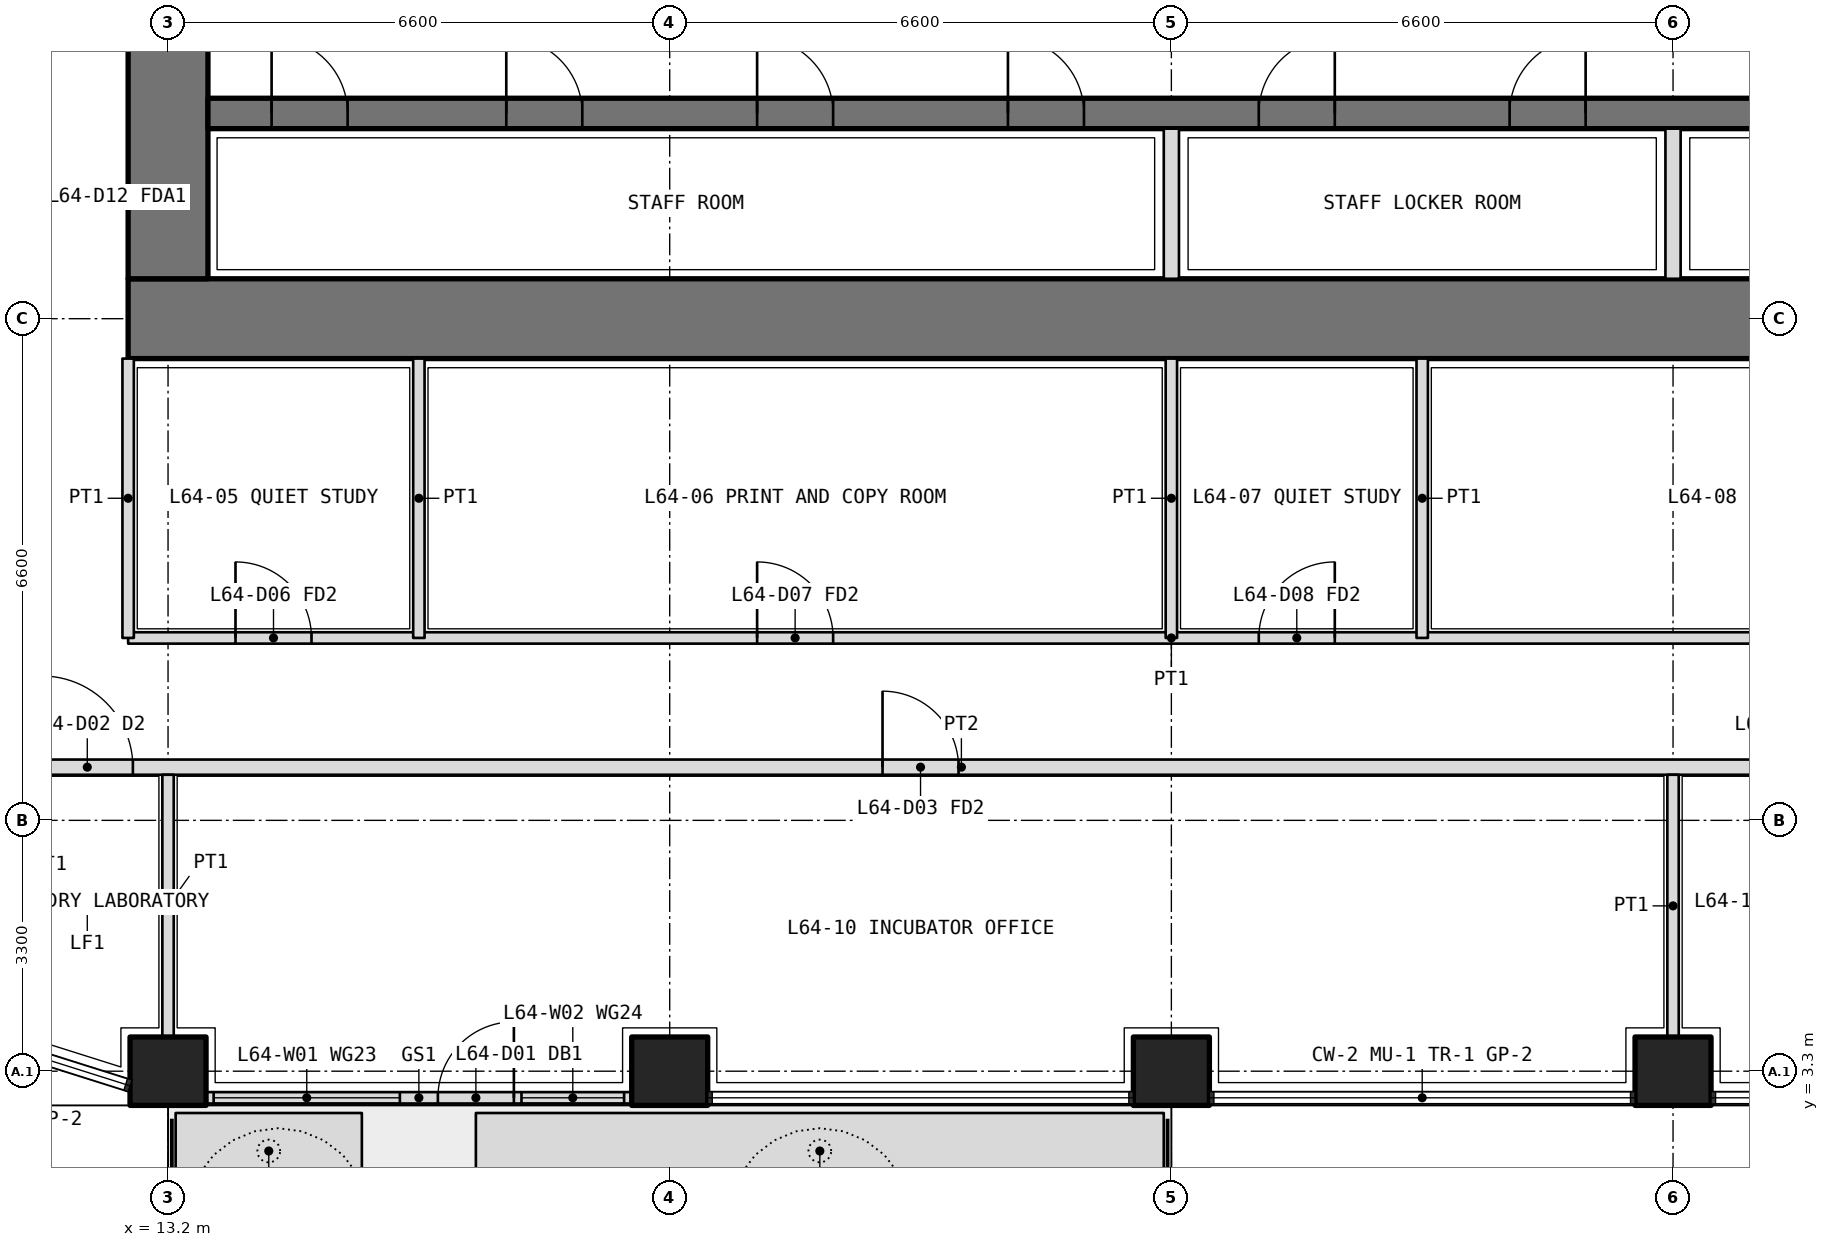
"""IFC4 building model, lengths in metres.
Left out: names, types, materials, properties, quantities, classifications, styles, units other than length and angle.
Written with IfcOpenShell. Run it as: python <this file> out.ifc"""

import sys

from ifc_helpers import new_model, si_unit, direction, frame, frame_2d, origin, origin_2d, place, context, subcontext, project, spatial, polyline, rectangle, outline, extrude, element, fill, save


model = new_model("IFC4")
c1 = context("Model", 3, precision=1e-05, world=origin(), true_north=direction((0.0, 1.0)))
c2 = subcontext(c1, "Body", "Model", "MODEL_VIEW")
j1 = project(units=[si_unit("LENGTHUNIT", "METRE"), si_unit("PLANEANGLEUNIT", "RADIAN")], contexts=[c1])
p1 = place(None, origin())
s1 = spatial("IfcSite", under=j1, at=p1, CompositionType="ELEMENT")
p2 = place(p1, origin())
s2 = spatial("IfcBuilding", under=s1, at=p2, CompositionType="ELEMENT")
p3 = place(p2, frame((0.0, 0.0, 279.6)))
s3 = spatial("IfcBuildingStorey", under=s2, at=p3, CompositionType="ELEMENT", Elevation=279.6)
for number, where, z_axis, x_axis in (
    (1, (13.2, 3.3, 0.0), (0.0, 0.0, 1.0), (1.0, 0.0, 0.0)),
    (2, (19.8, 3.3, 0.0), (0.0, 0.0, 1.0), (1.0, 0.0, 0.0)),
    (3, (26.4, 3.3, 0.0), (0.0, 0.0, 1.0), (1.0, 0.0, 0.0)),
    (4, (33.0, 3.3, 0.0), (0.0, 0.0, 1.0), (1.0, 0.0, 0.0)),
):
    element("IfcColumn", number, at=place(p3, frame(where, z_axis=z_axis, x_axis=x_axis)), inside=s3, PredefinedType="COLUMN", context=c2, shape_type="SweptSolid", body=[
        extrude(rectangle(XDim=1.0, YDim=0.9, at=origin_2d()), origin(), (0.0, 0.0, 1.0), 4.2),
    ])
p4 = place(p3, origin())
e5 = element("IfcWall", 5, at=p4, inside=s3, PredefinedType="USERDEFINED", context=c2, shape_type="SweptSolid", body=[
    extrude(outline(polyline([(13.3, 1.75), (15.75, 1.75), (15.75, 2.75), (13.3, 2.75), (13.3, 1.75)]), holes=[polyline([(13.45, 1.9), (15.6, 1.9), (15.6, 2.6), (13.45, 2.6), (13.45, 1.9)])]), origin(), (0.0, 0.0, 1.0), 1.05),
])
p5 = place(p3, origin())
e6 = element("IfcWall", 6, at=p5, inside=s3, PredefinedType="USERDEFINED", context=c2, shape_type="SweptSolid", body=[
    extrude(outline(polyline([(17.25, 1.75), (26.3, 1.75), (26.3, 2.75), (17.25, 2.75), (17.25, 1.75)]), holes=[polyline([(17.4, 1.9), (26.15, 1.9), (26.15, 2.6), (17.4, 2.6), (17.4, 1.9)])]), origin(), (0.0, 0.0, 1.0), 1.05),
])
p6 = place(p3, frame((13.7, 2.95, 0.0), z_axis=(0.0, 0.0, 1.0), x_axis=(1.0, 0.0, 0.0)))
e7 = element("IfcWall", 7, at=p6, inside=s3, PredefinedType="SOLIDWALL", context=c2, shape_type="SweptSolid", body=[
    extrude(rectangle(XDim=5.6, YDim=0.15, at=frame_2d((2.8, 0.0))), origin(), (0.0, 0.0, 1.0), 2.7),
])
p7 = place(p6, frame((3.05, 0.0, 0.0)))
e8 = element("IfcOpeningElement", 8, at=p7, cuts=e7, PredefinedType="OPENING", context=c2, shape_type="SweptSolid", body=[
    extrude(rectangle(XDim=1.0, YDim=2.4, at=frame_2d((0.5, 1.2))), frame((0.0, 0.085, 0.0), z_axis=(0.0, -1.0, 0.0), x_axis=(1.0, 0.0, 0.0)), (0.0, 0.0, 1.0), 0.17),
])
p8 = place(p6, frame((0.1, 0.0, 0.1)))
e9 = element("IfcOpeningElement", 9, at=p8, cuts=e7, PredefinedType="OPENING", context=c2, shape_type="SweptSolid", body=[
    extrude(rectangle(XDim=2.45, YDim=2.3, at=frame_2d((1.225, 1.15))), frame((0.0, 0.085, 0.0), z_axis=(0.0, -1.0, 0.0), x_axis=(1.0, 0.0, 0.0)), (0.0, 0.0, 1.0), 0.17),
])
p9 = place(p6, frame((4.15, 0.0, 0.1)))
e10 = element("IfcOpeningElement", 10, at=p9, cuts=e7, PredefinedType="OPENING", context=c2, shape_type="SweptSolid", body=[
    extrude(rectangle(XDim=1.35, YDim=2.3, at=frame_2d((0.675, 1.15))), frame((0.0, 0.085, 0.0), z_axis=(0.0, -1.0, 0.0), x_axis=(1.0, 0.0, 0.0)), (0.0, 0.0, 1.0), 0.17),
])
p10 = place(p3, frame((12.675, 13.2, 0.0), z_axis=(0.0, 0.0, 1.0), x_axis=(1.0, 0.0, 0.0)))
e11 = element("IfcWall", 11, at=p10, inside=s3, PredefinedType="SHEAR", context=c2, shape_type="SweptSolid", body=[
    extrude(rectangle(XDim=27.45, YDim=1.05, at=frame_2d((13.725, 0.0))), origin(), (0.0, 0.0, 1.0), 4.2),
])
p11 = place(p3, frame((13.2, 32.475, 0.0), z_axis=(0.0, 0.0, 1.0), x_axis=(0.0, -1.0, 0.0)))
e12 = element("IfcWall", 12, at=p11, inside=s3, PredefinedType="SHEAR", context=c2, shape_type="SweptSolid", body=[
    extrude(rectangle(XDim=18.75, YDim=1.05, at=frame_2d((9.375, 0.0))), origin(), (0.0, 0.0, 1.0), 4.2),
])
p12 = place(p11, frame((14.125, 0.0, 0.0)))
e13 = element("IfcOpeningElement", 13, at=p12, cuts=e12, PredefinedType="OPENING", context=c2, shape_type="SweptSolid", body=[
    extrude(rectangle(XDim=1.6, YDim=2.1, at=frame_2d((0.8, 1.05))), frame((0.0, 0.535, 0.0), z_axis=(0.0, -1.0, 0.0), x_axis=(1.0, 0.0, 0.0)), (0.0, 0.0, 1.0), 1.07),
])
p13 = place(p11, frame((3.325, 0.0, 0.0)))
e14 = element("IfcOpeningElement", 14, at=p13, cuts=e12, PredefinedType="OPENING", context=c2, shape_type="SweptSolid", body=[
    extrude(rectangle(XDim=1.6, YDim=2.1, at=frame_2d((0.8, 1.05))), frame((0.0, 0.535, 0.0), z_axis=(0.0, -1.0, 0.0), x_axis=(1.0, 0.0, 0.0)), (0.0, 0.0, 1.0), 1.07),
])
p14 = place(p3, frame((13.725, 15.9, 0.0), z_axis=(0.0, 0.0, 1.0), x_axis=(1.0, 0.0, 0.0)))
e15 = element("IfcWall", 15, at=p14, inside=s3, PredefinedType="SHEAR", context=c2, shape_type="SweptSolid", body=[
    extrude(rectangle(XDim=25.35, YDim=0.4, at=frame_2d((12.675, 0.0))), origin(), (0.0, 0.0, 1.0), 4.2),
])
p15 = place(p14, frame((0.837, 0.0, 0.0)))
e16 = element("IfcOpeningElement", 16, at=p15, cuts=e15, PredefinedType="OPENING", context=c2, shape_type="SweptSolid", body=[
    extrude(rectangle(XDim=1.0, YDim=2.1, at=frame_2d((0.5, 1.05))), frame((0.0, 0.21, 0.0), z_axis=(0.0, -1.0, 0.0), x_axis=(1.0, 0.0, 0.0)), (0.0, 0.0, 1.0), 0.42),
])
p16 = place(p14, frame((3.925, 0.0, 0.0)))
e17 = element("IfcOpeningElement", 17, at=p16, cuts=e15, PredefinedType="OPENING", context=c2, shape_type="SweptSolid", body=[
    extrude(rectangle(XDim=1.0, YDim=2.1, at=frame_2d((0.5, 1.05))), frame((0.0, 0.21, 0.0), z_axis=(0.0, -1.0, 0.0), x_axis=(1.0, 0.0, 0.0)), (0.0, 0.0, 1.0), 0.42),
])
p17 = place(p14, frame((7.225, 0.0, 0.0)))
e18 = element("IfcOpeningElement", 18, at=p17, cuts=e15, PredefinedType="OPENING", context=c2, shape_type="SweptSolid", body=[
    extrude(rectangle(XDim=1.0, YDim=2.1, at=frame_2d((0.5, 1.05))), frame((0.0, 0.21, 0.0), z_axis=(0.0, -1.0, 0.0), x_axis=(1.0, 0.0, 0.0)), (0.0, 0.0, 1.0), 0.42),
])
p18 = place(p14, frame((10.525, 0.0, 0.0)))
e19 = element("IfcOpeningElement", 19, at=p18, cuts=e15, PredefinedType="OPENING", context=c2, shape_type="SweptSolid", body=[
    extrude(rectangle(XDim=1.0, YDim=2.1, at=frame_2d((0.5, 1.05))), frame((0.0, 0.21, 0.0), z_axis=(0.0, -1.0, 0.0), x_axis=(1.0, 0.0, 0.0)), (0.0, 0.0, 1.0), 0.42),
])
p19 = place(p14, frame((13.825, 0.0, 0.0)))
e20 = element("IfcOpeningElement", 20, at=p19, cuts=e15, PredefinedType="OPENING", context=c2, shape_type="SweptSolid", body=[
    extrude(rectangle(XDim=1.0, YDim=2.1, at=frame_2d((0.5, 1.05))), frame((0.0, 0.21, 0.0), z_axis=(0.0, -1.0, 0.0), x_axis=(1.0, 0.0, 0.0)), (0.0, 0.0, 1.0), 0.42),
])
p20 = place(p14, frame((17.125, 0.0, 0.0)))
e21 = element("IfcOpeningElement", 21, at=p20, cuts=e15, PredefinedType="OPENING", context=c2, shape_type="SweptSolid", body=[
    extrude(rectangle(XDim=1.0, YDim=2.1, at=frame_2d((0.5, 1.05))), frame((0.0, 0.21, 0.0), z_axis=(0.0, -1.0, 0.0), x_axis=(1.0, 0.0, 0.0)), (0.0, 0.0, 1.0), 0.42),
])
p21 = place(p14, frame((20.425, 0.0, 0.0)))
e22 = element("IfcOpeningElement", 22, at=p21, cuts=e15, PredefinedType="OPENING", context=c2, shape_type="SweptSolid", body=[
    extrude(rectangle(XDim=1.0, YDim=2.1, at=frame_2d((0.5, 1.05))), frame((0.0, 0.21, 0.0), z_axis=(0.0, -1.0, 0.0), x_axis=(1.0, 0.0, 0.0)), (0.0, 0.0, 1.0), 0.42),
])
p22 = place(p14, frame((23.512, 0.0, 0.0)))
e23 = element("IfcOpeningElement", 23, at=p22, cuts=e15, PredefinedType="OPENING", context=c2, shape_type="SweptSolid", body=[
    extrude(rectangle(XDim=1.0, YDim=2.1, at=frame_2d((0.5, 1.05))), frame((0.0, 0.21, 0.0), z_axis=(0.0, -1.0, 0.0), x_axis=(1.0, 0.0, 0.0)), (0.0, 0.0, 1.0), 0.42),
])
for number, where, z_axis, x_axis in (
    (24, (26.4, 13.725, 0.0), (0.0, 0.0, 1.0), (0.0, 1.0, 0.0)),
    (25, (33.0, 13.725, 0.0), (0.0, 0.0, 1.0), (0.0, 1.0, 0.0)),
):
    element("IfcWall", number, at=place(p3, frame(where, z_axis=z_axis, x_axis=x_axis)), inside=s3, PredefinedType="PARTITIONING", context=c2, shape_type="SweptSolid", body=[
        extrude(rectangle(XDim=1.975, YDim=0.2, at=frame_2d((0.987, 0.0))), origin(), (0.0, 0.0, 1.0), 4.2),
    ])
p23 = place(p3, frame((12.675, 9.0, 0.0), z_axis=(0.0, 0.0, 1.0), x_axis=(1.0, 0.0, 0.0)))
e26 = element("IfcWall", 26, at=p23, inside=s3, PredefinedType="PARTITIONING", context=c2, shape_type="SweptSolid", body=[
    extrude(rectangle(XDim=27.45, YDim=0.15, at=frame_2d((13.725, 0.0))), origin(), (0.0, 0.0, 1.0), 3.0),
])
p24 = place(p23, frame((1.413, 0.0, 0.0)))
e27 = element("IfcOpeningElement", 27, at=p24, cuts=e26, PredefinedType="OPENING", context=c2, shape_type="SweptSolid", body=[
    extrude(rectangle(XDim=1.0, YDim=2.1, at=frame_2d((0.5, 1.05))), frame((0.0, 0.085, 0.0), z_axis=(0.0, -1.0, 0.0), x_axis=(1.0, 0.0, 0.0)), (0.0, 0.0, 1.0), 0.17),
])
p25 = place(p23, frame((8.275, 0.0, 0.0)))
e28 = element("IfcOpeningElement", 28, at=p25, cuts=e26, PredefinedType="OPENING", context=c2, shape_type="SweptSolid", body=[
    extrude(rectangle(XDim=1.0, YDim=2.1, at=frame_2d((0.5, 1.05))), frame((0.0, 0.085, 0.0), z_axis=(0.0, -1.0, 0.0), x_axis=(1.0, 0.0, 0.0)), (0.0, 0.0, 1.0), 0.17),
])
p26 = place(p23, frame((14.875, 0.0, 0.0)))
e29 = element("IfcOpeningElement", 29, at=p26, cuts=e26, PredefinedType="OPENING", context=c2, shape_type="SweptSolid", body=[
    extrude(rectangle(XDim=1.0, YDim=2.1, at=frame_2d((0.5, 1.05))), frame((0.0, 0.085, 0.0), z_axis=(0.0, -1.0, 0.0), x_axis=(1.0, 0.0, 0.0)), (0.0, 0.0, 1.0), 0.17),
])
p27 = place(p23, frame((21.738, 0.0, 0.0)))
e30 = element("IfcOpeningElement", 30, at=p27, cuts=e26, PredefinedType="OPENING", context=c2, shape_type="SweptSolid", body=[
    extrude(rectangle(XDim=1.0, YDim=2.1, at=frame_2d((0.5, 1.05))), frame((0.0, 0.085, 0.0), z_axis=(0.0, -1.0, 0.0), x_axis=(1.0, 0.0, 0.0)), (0.0, 0.0, 1.0), 0.17),
])
p28 = place(p3, frame((12.675, 12.675, 0.0), z_axis=(0.0, 0.0, 1.0), x_axis=(0.0, -1.0, 0.0)))
e31 = element("IfcWall", 31, at=p28, inside=s3, PredefinedType="PARTITIONING", context=c2, shape_type="SweptSolid", body=[
    extrude(rectangle(XDim=3.675, YDim=0.15, at=frame_2d((1.837, 0.0))), origin(), (0.0, 0.0, 1.0), 3.0),
])
p29 = place(p3, frame((16.5, 12.675, 0.0), z_axis=(0.0, 0.0, 1.0), x_axis=(0.0, -1.0, 0.0)))
e32 = element("IfcWall", 32, at=p29, inside=s3, PredefinedType="PARTITIONING", context=c2, shape_type="SweptSolid", body=[
    extrude(rectangle(XDim=3.675, YDim=0.15, at=frame_2d((1.837, 0.0))), origin(), (0.0, 0.0, 1.0), 3.9),
])
p30 = place(p3, frame((26.4, 12.675, 0.0), z_axis=(0.0, 0.0, 1.0), x_axis=(0.0, -1.0, 0.0)))
e33 = element("IfcWall", 33, at=p30, inside=s3, PredefinedType="PARTITIONING", context=c2, shape_type="SweptSolid", body=[
    extrude(rectangle(XDim=3.675, YDim=0.15, at=frame_2d((1.837, 0.0))), origin(), (0.0, 0.0, 1.0), 3.0),
])
p31 = place(p3, frame((29.7, 12.675, 0.0), z_axis=(0.0, 0.0, 1.0), x_axis=(0.0, -1.0, 0.0)))
e34 = element("IfcWall", 34, at=p31, inside=s3, PredefinedType="PARTITIONING", context=c2, shape_type="SweptSolid", body=[
    extrude(rectangle(XDim=3.675, YDim=0.15, at=frame_2d((1.837, 0.0))), origin(), (0.0, 0.0, 1.0), 3.9),
])
p32 = place(p3, frame((10.975, 7.3, 0.0), z_axis=(0.0, 0.0, 1.0), x_axis=(1.0, 0.0, 0.0)))
e35 = element("IfcWall", 35, at=p32, inside=s3, PredefinedType="PARTITIONING", context=c2, shape_type="SweptSolid", body=[
    extrude(rectangle(XDim=25.325, YDim=0.2, at=frame_2d((12.663, 0.0))), origin(), (0.0, 0.0, 1.0), 3.0),
])
p33 = place(p32, frame((0.562, 0.0, 0.0)))
e36 = element("IfcOpeningElement", 36, at=p33, cuts=e35, PredefinedType="OPENING", context=c2, shape_type="SweptSolid", body=[
    extrude(rectangle(XDim=1.2, YDim=2.1, at=frame_2d((0.6, 1.05))), frame((0.0, 0.11, 0.0), z_axis=(0.0, -1.0, 0.0), x_axis=(1.0, 0.0, 0.0)), (0.0, 0.0, 1.0), 0.22),
])
p34 = place(p32, frame((11.625, 0.0, 0.0)))
e37 = element("IfcOpeningElement", 37, at=p34, cuts=e35, PredefinedType="OPENING", context=c2, shape_type="SweptSolid", body=[
    extrude(rectangle(XDim=1.0, YDim=2.1, at=frame_2d((0.5, 1.05))), frame((0.0, 0.11, 0.0), z_axis=(0.0, -1.0, 0.0), x_axis=(1.0, 0.0, 0.0)), (0.0, 0.0, 1.0), 0.22),
])
p35 = place(p32, frame((23.175, 0.0, 0.0)))
e38 = element("IfcOpeningElement", 38, at=p35, cuts=e35, PredefinedType="OPENING", context=c2, shape_type="SweptSolid", body=[
    extrude(rectangle(XDim=1.0, YDim=2.1, at=frame_2d((0.5, 1.05))), frame((0.0, 0.11, 0.0), z_axis=(0.0, -1.0, 0.0), x_axis=(1.0, 0.0, 0.0)), (0.0, 0.0, 1.0), 0.22),
])
for number, where, z_axis, x_axis in (
    (39, (13.2, 3.75, 0.0), (0.0, 0.0, 1.0), (0.0, 1.0, 0.0)),
    (40, (33.0, 3.75, 0.0), (0.0, 0.0, 1.0), (0.0, 1.0, 0.0)),
):
    element("IfcWall", number, at=place(p3, frame(where, z_axis=z_axis, x_axis=x_axis)), inside=s3, PredefinedType="PARTITIONING", context=c2, shape_type="SweptSolid", body=[
        extrude(rectangle(XDim=3.45, YDim=0.15, at=frame_2d((1.725, 0.0))), origin(), (0.0, 0.0, 1.0), 3.0),
    ])
p36 = place(p7, origin())
e41 = element("IfcDoor", 41, at=p36, inside=s3, OperationType="SINGLE_SWING_RIGHT", PredefinedType="DOOR", context=c2, shape_type="SweptSolid", body=[
    extrude(rectangle(XDim=1.0, YDim=2.4, at=frame_2d((0.5, 1.2))), frame((0.0, 0.025, 0.0), z_axis=(0.0, -1.0, 0.0), x_axis=(1.0, 0.0, 0.0)), (0.0, 0.0, 1.0), 0.05),
])
fill(e8, e41)
p37 = place(p8, origin())
e42 = element("IfcWindow", 42, at=p37, inside=s3, PartitioningType="SINGLE_PANEL", PredefinedType="WINDOW", context=c2, shape_type="SweptSolid", body=[
    extrude(rectangle(XDim=2.45, YDim=2.3, at=frame_2d((1.225, 1.15))), frame((0.0, 0.03, 0.0), z_axis=(0.0, -1.0, 0.0), x_axis=(1.0, 0.0, 0.0)), (0.0, 0.0, 1.0), 0.06),
])
fill(e9, e42)
p38 = place(p9, origin())
e43 = element("IfcWindow", 43, at=p38, inside=s3, PartitioningType="SINGLE_PANEL", PredefinedType="WINDOW", context=c2, shape_type="SweptSolid", body=[
    extrude(rectangle(XDim=1.35, YDim=2.3, at=frame_2d((0.675, 1.15))), frame((0.0, 0.03, 0.0), z_axis=(0.0, -1.0, 0.0), x_axis=(1.0, 0.0, 0.0)), (0.0, 0.0, 1.0), 0.06),
])
fill(e10, e43)
p39 = place(p24, origin())
e44 = element("IfcDoor", 44, at=p39, inside=s3, OperationType="SINGLE_SWING_LEFT", PredefinedType="DOOR", context=c2, shape_type="SweptSolid", body=[
    extrude(rectangle(XDim=1.0, YDim=2.1, at=frame_2d((0.5, 1.05))), frame((0.0, 0.025, 0.0), z_axis=(0.0, -1.0, 0.0), x_axis=(1.0, 0.0, 0.0)), (0.0, 0.0, 1.0), 0.05),
])
fill(e27, e44)
p40 = place(p25, origin())
e45 = element("IfcDoor", 45, at=p40, inside=s3, OperationType="SINGLE_SWING_LEFT", PredefinedType="DOOR", context=c2, shape_type="SweptSolid", body=[
    extrude(rectangle(XDim=1.0, YDim=2.1, at=frame_2d((0.5, 1.05))), frame((0.0, 0.025, 0.0), z_axis=(0.0, -1.0, 0.0), x_axis=(1.0, 0.0, 0.0)), (0.0, 0.0, 1.0), 0.05),
])
fill(e28, e45)
p41 = place(p26, origin())
e46 = element("IfcDoor", 46, at=p41, inside=s3, OperationType="SINGLE_SWING_RIGHT", PredefinedType="DOOR", context=c2, shape_type="SweptSolid", body=[
    extrude(rectangle(XDim=1.0, YDim=2.1, at=frame_2d((0.5, 1.05))), frame((0.0, 0.025, 0.0), z_axis=(0.0, -1.0, 0.0), x_axis=(1.0, 0.0, 0.0)), (0.0, 0.0, 1.0), 0.05),
])
fill(e29, e46)
p42 = place(p33, origin())
e47 = element("IfcDoor", 47, at=p42, inside=s3, OperationType="DOUBLE_DOOR_SINGLE_SWING", PredefinedType="DOOR", context=c2, shape_type="SweptSolid", body=[
    extrude(rectangle(XDim=1.2, YDim=2.1, at=frame_2d((0.6, 1.05))), frame((0.0, 0.025, 0.0), z_axis=(0.0, -1.0, 0.0), x_axis=(1.0, 0.0, 0.0)), (0.0, 0.0, 1.0), 0.05),
])
fill(e36, e47)
p43 = place(p34, origin())
e48 = element("IfcDoor", 48, at=p43, inside=s3, OperationType="SINGLE_SWING_LEFT", PredefinedType="DOOR", context=c2, shape_type="SweptSolid", body=[
    extrude(rectangle(XDim=1.0, YDim=2.1, at=frame_2d((0.5, 1.05))), frame((0.0, 0.025, 0.0), z_axis=(0.0, -1.0, 0.0), x_axis=(1.0, 0.0, 0.0)), (0.0, 0.0, 1.0), 0.05),
])
fill(e37, e48)
p44 = place(p15, origin())
e49 = element("IfcDoor", 49, at=p44, inside=s3, OperationType="SINGLE_SWING_LEFT", PredefinedType="DOOR", context=c2, shape_type="SweptSolid", body=[
    extrude(rectangle(XDim=1.0, YDim=2.1, at=frame_2d((0.5, 1.05))), frame((0.0, 0.025, 0.0), z_axis=(0.0, -1.0, 0.0), x_axis=(1.0, 0.0, 0.0)), (0.0, 0.0, 1.0), 0.05),
])
fill(e16, e49)
p45 = place(p16, origin())
e50 = element("IfcDoor", 50, at=p45, inside=s3, OperationType="SINGLE_SWING_LEFT", PredefinedType="DOOR", context=c2, shape_type="SweptSolid", body=[
    extrude(rectangle(XDim=1.0, YDim=2.1, at=frame_2d((0.5, 1.05))), frame((0.0, 0.025, 0.0), z_axis=(0.0, -1.0, 0.0), x_axis=(1.0, 0.0, 0.0)), (0.0, 0.0, 1.0), 0.05),
])
fill(e17, e50)
p46 = place(p17, origin())
e51 = element("IfcDoor", 51, at=p46, inside=s3, OperationType="SINGLE_SWING_LEFT", PredefinedType="DOOR", context=c2, shape_type="SweptSolid", body=[
    extrude(rectangle(XDim=1.0, YDim=2.1, at=frame_2d((0.5, 1.05))), frame((0.0, 0.025, 0.0), z_axis=(0.0, -1.0, 0.0), x_axis=(1.0, 0.0, 0.0)), (0.0, 0.0, 1.0), 0.05),
])
fill(e18, e51)
p47 = place(p18, origin())
e52 = element("IfcDoor", 52, at=p47, inside=s3, OperationType="SINGLE_SWING_LEFT", PredefinedType="DOOR", context=c2, shape_type="SweptSolid", body=[
    extrude(rectangle(XDim=1.0, YDim=2.1, at=frame_2d((0.5, 1.05))), frame((0.0, 0.025, 0.0), z_axis=(0.0, -1.0, 0.0), x_axis=(1.0, 0.0, 0.0)), (0.0, 0.0, 1.0), 0.05),
])
fill(e19, e52)
p48 = place(p19, origin())
e53 = element("IfcDoor", 53, at=p48, inside=s3, OperationType="SINGLE_SWING_RIGHT", PredefinedType="DOOR", context=c2, shape_type="SweptSolid", body=[
    extrude(rectangle(XDim=1.0, YDim=2.1, at=frame_2d((0.5, 1.05))), frame((0.0, 0.025, 0.0), z_axis=(0.0, -1.0, 0.0), x_axis=(1.0, 0.0, 0.0)), (0.0, 0.0, 1.0), 0.05),
])
fill(e20, e53)
p49 = place(p20, origin())
e54 = element("IfcDoor", 54, at=p49, inside=s3, OperationType="SINGLE_SWING_RIGHT", PredefinedType="DOOR", context=c2, shape_type="SweptSolid", body=[
    extrude(rectangle(XDim=1.0, YDim=2.1, at=frame_2d((0.5, 1.05))), frame((0.0, 0.025, 0.0), z_axis=(0.0, -1.0, 0.0), x_axis=(1.0, 0.0, 0.0)), (0.0, 0.0, 1.0), 0.05),
])
fill(e21, e54)
save(model, sys.argv[1])
